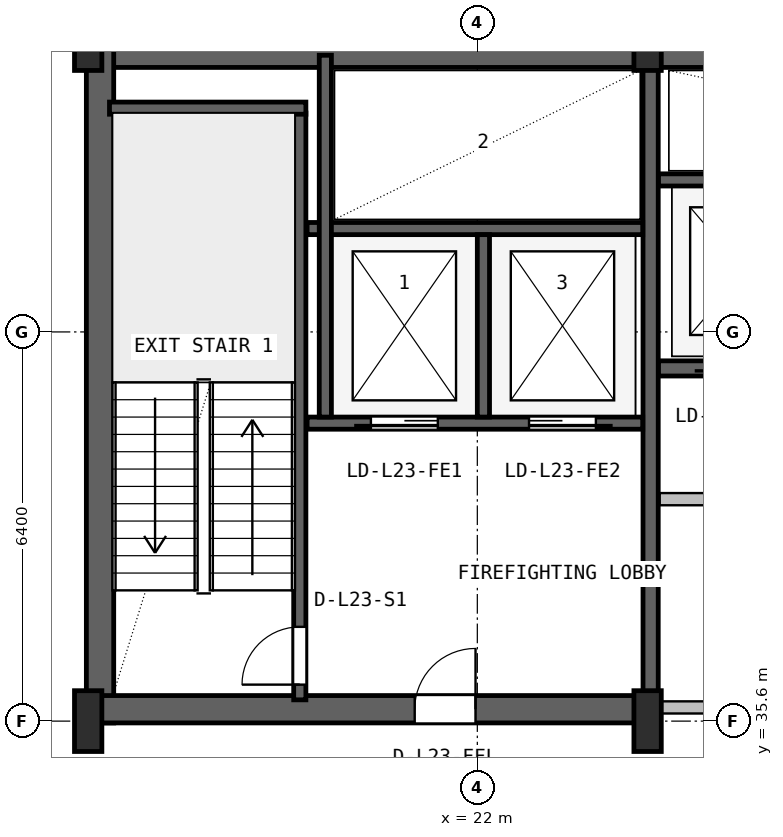
"""IFC4 building model, lengths in metres.
Left out: names, types, materials, properties, quantities, classifications, styles, units other than length and angle.
Written with IfcOpenShell. Run it as: python <this file> out.ifc"""

import sys

from ifc_helpers import new_model, si_unit, direction, frame, frame_2d, origin, origin_2d, place, context, subcontext, project, spatial, rectangle, i_section, extrude, source, transform, mapped, element, fill, save


model = new_model("IFC4")
c1 = context("Model", 3, precision=1e-05, world=origin(), true_north=direction((0.0, 1.0)))
c2 = subcontext(c1, "Body", "Model", "MODEL_VIEW")
j1 = project(units=[si_unit("LENGTHUNIT", "METRE"), si_unit("PLANEANGLEUNIT", "RADIAN")], contexts=[c1])
p1 = place(None, origin())
s1 = spatial("IfcSite", under=j1, at=p1, CompositionType="ELEMENT")
p2 = place(p1, origin())
s2 = spatial("IfcBuilding", under=s1, at=p2, CompositionType="ELEMENT")
p3 = place(p2, frame((0.0, 0.0, 98.4)))
s3 = spatial("IfcBuildingStorey", under=s2, at=p3, CompositionType="ELEMENT", Elevation=98.4)
p4 = place(p3, frame((15.6, 46.575, 0.0), z_axis=(0.0, 0.0, 1.0), x_axis=(1.0, 0.0, 0.0)))
e1 = element("IfcWall", 1, at=p4, inside=s3, PredefinedType="SHEAR", context=c2, shape_type="SweptSolid", body=[
    extrude(rectangle(XDim=36.8, YDim=0.45, at=frame_2d((18.4, 0.0))), origin(), (0.0, 0.0, 1.0), 4.35),
])
p5 = place(p3, frame((15.795, 35.57, 0.0), z_axis=(0.0, 0.0, 1.0), x_axis=(0.0, 1.0, 0.0)))
e2 = element("IfcWall", 2, at=p5, inside=s3, PredefinedType="SHEAR", context=c2, shape_type="SweptSolid", body=[
    extrude(rectangle(XDim=11.23, YDim=0.45, at=frame_2d((5.615, 0.0))), origin(), (0.0, 0.0, 1.0), 4.35),
])
p6 = place(p3, frame((15.57, 35.795, 0.0), z_axis=(0.0, 0.0, 1.0), x_axis=(1.0, 0.0, 0.0)))
e3 = element("IfcWall", 3, at=p6, inside=s3, PredefinedType="SHEAR", context=c2, shape_type="SweptSolid", body=[
    extrude(rectangle(XDim=9.23, YDim=0.45, at=frame_2d((4.615, 0.0))), origin(), (0.0, 0.0, 1.0), 4.35),
])
p7 = place(p6, frame((5.4, 0.0, 0.0)))
e4 = element("IfcOpeningElement", 4, at=p7, cuts=e3, PredefinedType="OPENING", context=c2, shape_type="SweptSolid", body=[
    extrude(rectangle(XDim=1.0, YDim=2.1, at=frame_2d((0.5, 1.05))), frame((0.0, 0.235, 0.0), z_axis=(0.0, -1.0, 0.0), x_axis=(1.0, 0.0, 0.0)), (0.0, 0.0, 1.0), 0.47),
])
m1 = source(origin(), c2, "Body", "SweptSolid", [
    extrude(i_section(OverallWidth=0.45, OverallDepth=1.0, WebThickness=0.016, FlangeThickness=0.03, FilletRadius=0.016, at=origin_2d()), origin(), (0.0, 0.0, 1.0), 4.6),
])
for number, where, z_axis, x_axis in (
    (5, (15.6, 35.6, 0.0), (0.0, 0.0, 1.0), (1.0, 0.0, 0.0)),
    (6, (15.6, 46.8, 0.0), (0.0, 0.0, 1.0), (1.0, 0.0, 0.0)),
    (7, (24.8, 35.6, 0.0), (0.0, 0.0, 1.0), (1.0, 0.0, 0.0)),
    (8, (24.8, 46.8, 0.0), (0.0, 0.0, 1.0), (1.0, 0.0, 0.0)),
):
    element("IfcColumn", number, at=place(p3, frame(where, z_axis=z_axis, x_axis=x_axis)), inside=s3, PredefinedType="COLUMN", context=c2, shape_type="MappedRepresentation", body=[
        mapped(m1, transform((0.0, 0.0, 0.0), x_axis=(1.0, 0.0, 0.0), y_axis=(0.0, 1.0, 0.0), z_axis=(0.0, 0.0, 1.0), scale=1.0)),
    ])
p8 = place(p3, frame((19.08, 35.95, 0.0), z_axis=(0.0, 0.0, 1.0), x_axis=(0.0, 1.0, 0.0)))
e9 = element("IfcWall", 9, at=p8, inside=s3, PredefinedType="SHEAR", context=c2, shape_type="SweptSolid", body=[
    extrude(rectangle(XDim=9.65, YDim=0.2, at=frame_2d((4.825, 0.0))), origin(), (0.0, 0.0, 1.0), 4.35),
])
p9 = place(p8, frame((0.25, 0.0, 0.0)))
e10 = element("IfcOpeningElement", 10, at=p9, cuts=e9, PredefinedType="OPENING", context=c2, shape_type="SweptSolid", body=[
    extrude(rectangle(XDim=0.95, YDim=2.1, at=frame_2d((0.475, 1.05))), frame((0.0, 0.11, 0.0), z_axis=(0.0, -1.0, 0.0), x_axis=(1.0, 0.0, 0.0)), (0.0, 0.0, 1.0), 0.22),
])
p10 = place(p3, frame((15.95, 45.68, 0.0), z_axis=(0.0, 0.0, 1.0), x_axis=(1.0, 0.0, 0.0)))
e11 = element("IfcWall", 11, at=p10, inside=s3, PredefinedType="SHEAR", context=c2, shape_type="SweptSolid", body=[
    extrude(rectangle(XDim=3.23, YDim=0.2, at=frame_2d((1.615, 0.0))), origin(), (0.0, 0.0, 1.0), 4.35),
])
p11 = place(p3, frame((24.85, 36.05, 0.0), z_axis=(0.0, 0.0, 1.0), x_axis=(0.0, 1.0, 0.0)))
e12 = element("IfcWall", 12, at=p11, inside=s3, PredefinedType="SHEAR", context=c2, shape_type="SweptSolid", body=[
    extrude(rectangle(XDim=10.45, YDim=0.25, at=frame_2d((5.225, 0.0))), origin(), (0.0, 0.0, 1.0), 4.35),
])
p12 = place(p3, frame((19.2, 40.5, 0.0), z_axis=(0.0, 0.0, 1.0), x_axis=(1.0, 0.0, 0.0)))
e13 = element("IfcWall", 13, at=p12, inside=s3, PredefinedType="SHEAR", context=c2, shape_type="SweptSolid", body=[
    extrude(rectangle(XDim=5.52, YDim=0.2, at=frame_2d((2.76, 0.0))), origin(), (0.0, 0.0, 1.0), 4.35),
])
p13 = place(p12, frame((1.05, 0.0, 0.0)))
e14 = element("IfcOpeningElement", 14, at=p13, cuts=e13, PredefinedType="OPENING", context=c2, shape_type="SweptSolid", body=[
    extrude(rectangle(XDim=1.1, YDim=2.18, at=frame_2d((0.55, 1.09))), frame((0.0, 0.11, 0.0), z_axis=(0.0, -1.0, 0.0), x_axis=(1.0, 0.0, 0.0)), (0.0, 0.0, 1.0), 0.22),
])
p14 = place(p12, frame((3.65, 0.0, 0.0)))
e15 = element("IfcOpeningElement", 15, at=p14, cuts=e13, PredefinedType="OPENING", context=c2, shape_type="SweptSolid", body=[
    extrude(rectangle(XDim=1.1, YDim=2.18, at=frame_2d((0.55, 1.09))), frame((0.0, 0.11, 0.0), z_axis=(0.0, -1.0, 0.0), x_axis=(1.0, 0.0, 0.0)), (0.0, 0.0, 1.0), 0.22),
])
p15 = place(p3, frame((19.2, 43.7, 0.0), z_axis=(0.0, 0.0, 1.0), x_axis=(1.0, 0.0, 0.0)))
e16 = element("IfcWall", 16, at=p15, inside=s3, PredefinedType="SHEAR", context=c2, shape_type="SweptSolid", body=[
    extrude(rectangle(XDim=5.52, YDim=0.2, at=frame_2d((2.76, 0.0))), origin(), (0.0, 0.0, 1.0), 4.35),
])
p16 = place(p3, frame((22.1, 40.6, 0.0), z_axis=(0.0, 0.0, 1.0), x_axis=(0.0, 1.0, 0.0)))
e17 = element("IfcWall", 17, at=p16, inside=s3, PredefinedType="SHEAR", context=c2, shape_type="SweptSolid", body=[
    extrude(rectangle(XDim=3.0, YDim=0.2, at=frame_2d((1.5, 0.0))), origin(), (0.0, 0.0, 1.0), 4.35),
])
p17 = place(p3, frame((19.5, 40.6, 0.0), z_axis=(0.0, 0.0, 1.0), x_axis=(0.0, 1.0, 0.0)))
e18 = element("IfcWall", 18, at=p17, inside=s3, PredefinedType="SHEAR", context=c2, shape_type="SweptSolid", body=[
    extrude(rectangle(XDim=5.95, YDim=0.2, at=frame_2d((2.975, 0.0))), origin(), (0.0, 0.0, 1.0), 4.35),
])
p18 = place(p3, frame((24.98, 41.4, 0.0), z_axis=(0.0, 0.0, 1.0), x_axis=(1.0, 0.0, 0.0)))
e19 = element("IfcWall", 19, at=p18, inside=s3, PredefinedType="SHEAR", context=c2, shape_type="SweptSolid", body=[
    extrude(rectangle(XDim=23.82, YDim=0.25, at=frame_2d((11.91, 0.0))), origin(), (0.0, 0.0, 1.0), 4.35),
])
p19 = place(p18, frame((0.87, 0.0, 0.0)))
e20 = element("IfcOpeningElement", 20, at=p19, cuts=e19, PredefinedType="OPENING", context=c2, shape_type="SweptSolid", body=[
    extrude(rectangle(XDim=1.1, YDim=2.18, at=frame_2d((0.55, 1.09))), frame((0.0, 0.135, 0.0), z_axis=(0.0, -1.0, 0.0), x_axis=(1.0, 0.0, 0.0)), (0.0, 0.0, 1.0), 0.27),
])
p20 = place(p18, frame((3.47, 0.0, 0.0)))
e21 = element("IfcOpeningElement", 21, at=p20, cuts=e19, PredefinedType="OPENING", context=c2, shape_type="SweptSolid", body=[
    extrude(rectangle(XDim=1.1, YDim=2.18, at=frame_2d((0.55, 1.09))), frame((0.0, 0.135, 0.0), z_axis=(0.0, -1.0, 0.0), x_axis=(1.0, 0.0, 0.0)), (0.0, 0.0, 1.0), 0.27),
])
p21 = place(p18, frame((6.07, 0.0, 0.0)))
e22 = element("IfcOpeningElement", 22, at=p21, cuts=e19, PredefinedType="OPENING", context=c2, shape_type="SweptSolid", body=[
    extrude(rectangle(XDim=1.1, YDim=2.18, at=frame_2d((0.55, 1.09))), frame((0.0, 0.135, 0.0), z_axis=(0.0, -1.0, 0.0), x_axis=(1.0, 0.0, 0.0)), (0.0, 0.0, 1.0), 0.27),
])
p22 = place(p18, frame((8.87, 0.0, 0.0)))
e23 = element("IfcOpeningElement", 23, at=p22, cuts=e19, PredefinedType="OPENING", context=c2, shape_type="SweptSolid", body=[
    extrude(rectangle(XDim=1.1, YDim=2.18, at=frame_2d((0.55, 1.09))), frame((0.0, 0.135, 0.0), z_axis=(0.0, -1.0, 0.0), x_axis=(1.0, 0.0, 0.0)), (0.0, 0.0, 1.0), 0.27),
])
p23 = place(p18, frame((11.47, 0.0, 0.0)))
e24 = element("IfcOpeningElement", 24, at=p23, cuts=e19, PredefinedType="OPENING", context=c2, shape_type="SweptSolid", body=[
    extrude(rectangle(XDim=1.1, YDim=2.18, at=frame_2d((0.55, 1.09))), frame((0.0, 0.135, 0.0), z_axis=(0.0, -1.0, 0.0), x_axis=(1.0, 0.0, 0.0)), (0.0, 0.0, 1.0), 0.27),
])
p24 = place(p18, frame((14.07, 0.0, 0.0)))
e25 = element("IfcOpeningElement", 25, at=p24, cuts=e19, PredefinedType="OPENING", context=c2, shape_type="SweptSolid", body=[
    extrude(rectangle(XDim=1.1, YDim=2.18, at=frame_2d((0.55, 1.09))), frame((0.0, 0.135, 0.0), z_axis=(0.0, -1.0, 0.0), x_axis=(1.0, 0.0, 0.0)), (0.0, 0.0, 1.0), 0.27),
])
p25 = place(p3, frame((24.98, 44.5, 0.0), z_axis=(0.0, 0.0, 1.0), x_axis=(1.0, 0.0, 0.0)))
e26 = element("IfcWall", 26, at=p25, inside=s3, PredefinedType="SHEAR", context=c2, shape_type="SweptSolid", body=[
    extrude(rectangle(XDim=7.87, YDim=0.2, at=frame_2d((3.935, 0.0))), origin(), (0.0, 0.0, 1.0), 4.35),
])
p26 = place(p3, frame((25.0, 35.825, 0.0), z_axis=(0.0, 0.0, 1.0), x_axis=(1.0, 0.0, 0.0)))
e27 = element("IfcWall", 27, at=p26, inside=s3, PredefinedType="SOLIDWALL", context=c2, shape_type="SweptSolid", body=[
    extrude(rectangle(XDim=12.95, YDim=0.2, at=frame_2d((6.475, 0.0))), origin(), (0.0, 0.0, 1.0), 3.125),
])
p27 = place(p3, frame((25.0, 39.25, 0.0), z_axis=(0.0, 0.0, 1.0), x_axis=(1.0, 0.0, 0.0)))
e28 = element("IfcWall", 28, at=p27, inside=s3, PredefinedType="SOLIDWALL", context=c2, shape_type="SweptSolid", body=[
    extrude(rectangle(XDim=12.95, YDim=0.2, at=frame_2d((6.475, 0.0))), origin(), (0.0, 0.0, 1.0), 4.33),
])
p28 = place(p27, frame((1.1, 0.0, 0.0)))
e29 = element("IfcOpeningElement", 29, at=p28, cuts=e28, PredefinedType="OPENING", context=c2, shape_type="SweptSolid", body=[
    extrude(rectangle(XDim=0.9, YDim=2.06, at=frame_2d((0.45, 1.03))), frame((0.0, 0.11, 0.0), z_axis=(0.0, -1.0, 0.0), x_axis=(1.0, 0.0, 0.0)), (0.0, 0.0, 1.0), 0.22),
])
p29 = place(p27, frame((4.5, 0.0, 0.0)))
e30 = element("IfcOpeningElement", 30, at=p29, cuts=e28, PredefinedType="OPENING", context=c2, shape_type="SweptSolid", body=[
    extrude(rectangle(XDim=0.9, YDim=2.06, at=frame_2d((0.45, 1.03))), frame((0.0, 0.11, 0.0), z_axis=(0.0, -1.0, 0.0), x_axis=(1.0, 0.0, 0.0)), (0.0, 0.0, 1.0), 0.22),
])
p30 = place(p27, frame((7.84, 0.0, 0.0)))
e31 = element("IfcOpeningElement", 31, at=p30, cuts=e28, PredefinedType="OPENING", context=c2, shape_type="SweptSolid", body=[
    extrude(rectangle(XDim=0.92, YDim=2.08, at=frame_2d((0.46, 1.04))), frame((0.0, 0.11, 0.0), z_axis=(0.0, -1.0, 0.0), x_axis=(1.0, 0.0, 0.0)), (0.0, 0.0, 1.0), 0.22),
])
p31 = place(p27, frame((10.875, 0.0, 0.0)))
e32 = element("IfcOpeningElement", 32, at=p31, cuts=e28, PredefinedType="OPENING", context=c2, shape_type="SweptSolid", body=[
    extrude(rectangle(XDim=1.2, YDim=2.1, at=frame_2d((0.6, 1.05))), frame((0.0, 0.11, 0.0), z_axis=(0.0, -1.0, 0.0), x_axis=(1.0, 0.0, 0.0)), (0.0, 0.0, 1.0), 0.22),
])
m2 = source(origin(), c2, "Body", "SweptSolid", [
    extrude(rectangle(XDim=0.95, YDim=2.1, at=frame_2d((0.475, 1.05))), frame((0.0, 0.025, 0.0), z_axis=(0.0, -1.0, 0.0), x_axis=(1.0, 0.0, 0.0)), (0.0, 0.0, 1.0), 0.05),
])
p32 = place(p9, origin())
e33 = element("IfcDoor", 33, at=p32, inside=s3, OperationType="SINGLE_SWING_LEFT", PredefinedType="DOOR", context=c2, shape_type="MappedRepresentation", body=[
    mapped(m2, transform((0.0, 0.0, 0.0), x_axis=(1.0, 0.0, 0.0), y_axis=(0.0, 1.0, 0.0), z_axis=(0.0, 0.0, 1.0), scale=1.0)),
])
fill(e10, e33)
m3 = source(origin(), c2, "Body", "SweptSolid", [
    extrude(rectangle(XDim=1.0, YDim=2.1, at=frame_2d((0.5, 1.05))), frame((0.0, 0.025, 0.0), z_axis=(0.0, -1.0, 0.0), x_axis=(1.0, 0.0, 0.0)), (0.0, 0.0, 1.0), 0.05),
])
p33 = place(p7, origin())
e34 = element("IfcDoor", 34, at=p33, inside=s3, OperationType="SINGLE_SWING_RIGHT", PredefinedType="DOOR", context=c2, shape_type="MappedRepresentation", body=[
    mapped(m3, transform((0.0, 0.0, 0.0), x_axis=(1.0, 0.0, 0.0), y_axis=(0.0, 1.0, 0.0), z_axis=(0.0, 0.0, 1.0), scale=1.0)),
])
fill(e4, e34)
m4 = source(origin(), c2, "Body", "SweptSolid", [
    extrude(rectangle(XDim=1.1, YDim=2.18, at=frame_2d((0.55, 1.09))), frame((0.0, 0.025, 0.0), z_axis=(0.0, -1.0, 0.0), x_axis=(1.0, 0.0, 0.0)), (0.0, 0.0, 1.0), 0.05),
])
p34 = place(p13, frame((1.1, 0.0, 0.0), z_axis=(0.0, 0.0, 1.0), x_axis=(-1.0, 0.0, 0.0)))
e35 = element("IfcDoor", 35, at=p34, inside=s3, OperationType="SLIDING_TO_LEFT", PredefinedType="DOOR", context=c2, shape_type="MappedRepresentation", body=[
    mapped(m4, transform((0.0, 0.0, 0.0), x_axis=(1.0, 0.0, 0.0), y_axis=(0.0, 1.0, 0.0), z_axis=(0.0, 0.0, 1.0), scale=1.0)),
])
fill(e14, e35)
p35 = place(p14, frame((1.1, 0.0, 0.0), z_axis=(0.0, 0.0, 1.0), x_axis=(-1.0, 0.0, 0.0)))
e36 = element("IfcDoor", 36, at=p35, inside=s3, OperationType="SLIDING_TO_RIGHT", PredefinedType="DOOR", context=c2, shape_type="MappedRepresentation", body=[
    mapped(m4, transform((0.0, 0.0, 0.0), x_axis=(1.0, 0.0, 0.0), y_axis=(0.0, 1.0, 0.0), z_axis=(0.0, 0.0, 1.0), scale=1.0)),
])
fill(e15, e36)
save(model, sys.argv[1])
